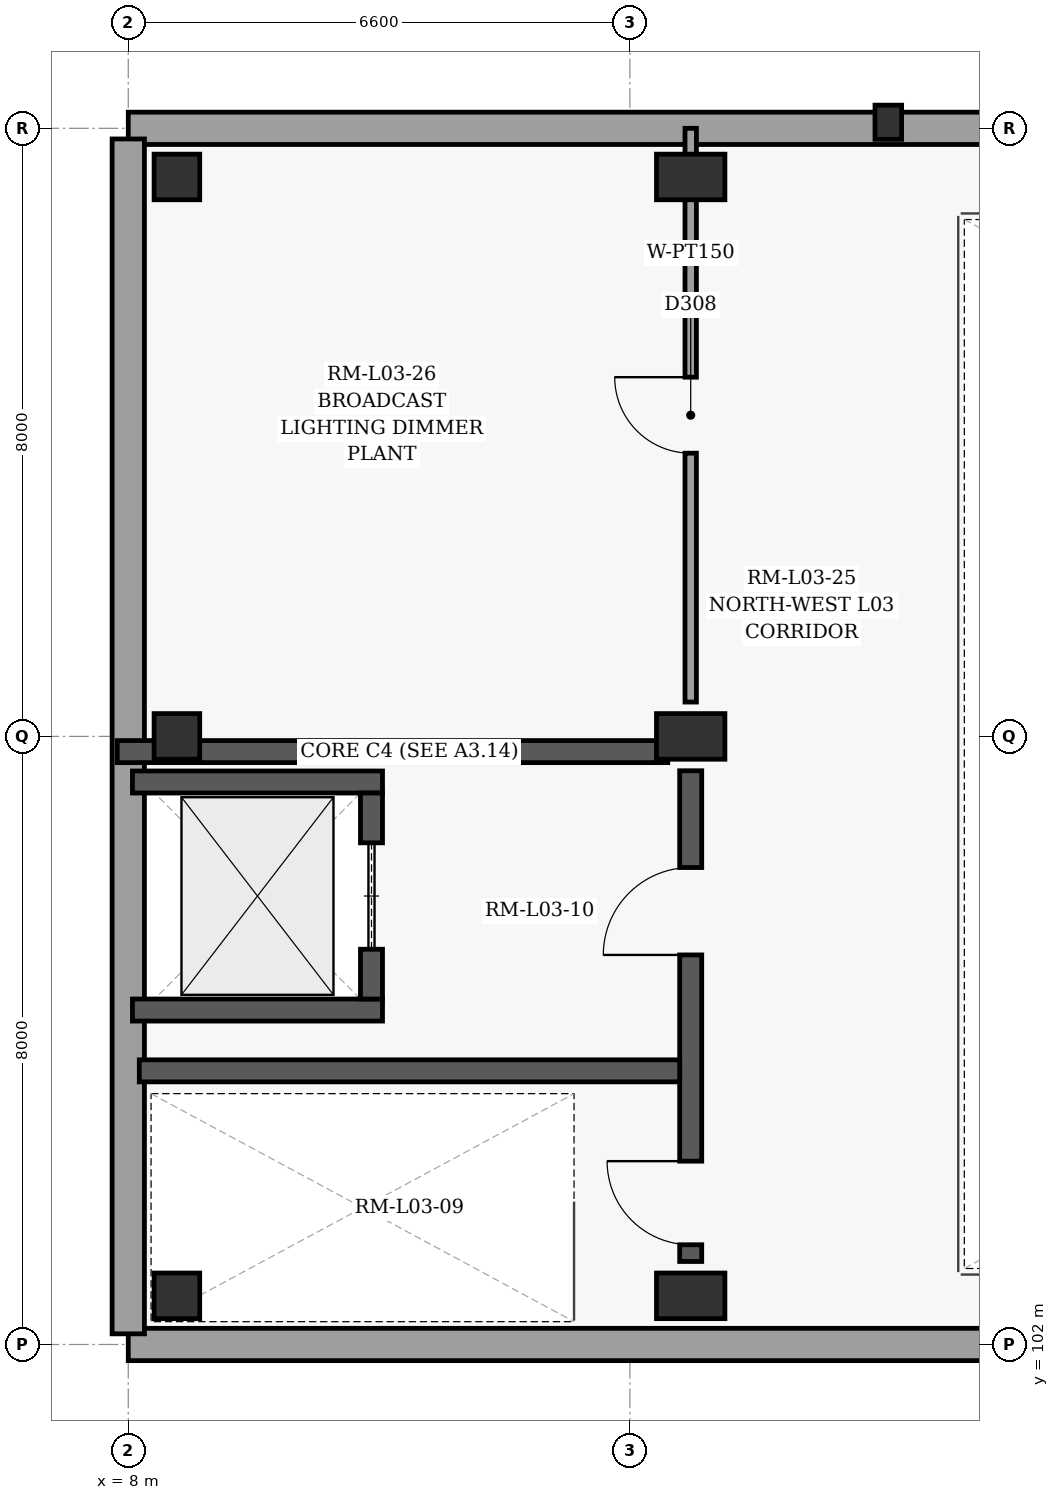
"""IFC4 building model, lengths in metres.
Left out: names, types, materials, properties, quantities, classifications, styles, units other than length and angle.
Written with IfcOpenShell. Run it as: python <this file> out.ifc"""

import sys

from ifc_helpers import new_model, si_unit, direction, frame, frame_2d, origin, origin_2d, place, context, subcontext, project, spatial, rectangle, extrude, element, fill, save


model = new_model("IFC4")
c1 = context("Model", 3, precision=1e-05, world=origin(), true_north=direction((0.0, 1.0)))
c2 = subcontext(c1, "Body", "Model", "MODEL_VIEW")
j1 = project(units=[si_unit("LENGTHUNIT", "METRE"), si_unit("PLANEANGLEUNIT", "RADIAN")], contexts=[c1])
p1 = place(None, origin())
s1 = spatial("IfcSite", under=j1, at=p1, CompositionType="ELEMENT")
p2 = place(p1, origin())
s2 = spatial("IfcBuilding", under=s1, at=p2, CompositionType="ELEMENT")
p3 = place(p2, frame((0.0, 0.0, 15.6)))
s3 = spatial("IfcBuildingStorey", under=s2, at=p3, CompositionType="ELEMENT", Elevation=15.6)
for number, where, z_axis, x_axis in (
    (1, (8.64, 102.64, 0.0), (0.0, 0.0, 1.0), (1.0, 0.0, 0.0)),
    (2, (8.64, 110.0, 0.0), (0.0, 0.0, 1.0), (1.0, 0.0, 0.0)),
    (3, (8.64, 117.36, 0.0), (0.0, 0.0, 1.0), (1.0, 0.0, 0.0)),
):
    element("IfcColumn", number, at=place(p3, frame(where, z_axis=z_axis, x_axis=x_axis)), inside=s3, PredefinedType="COLUMN", context=c2, shape_type="SweptSolid", body=[
        extrude(rectangle(XDim=0.6, YDim=0.6, at=origin_2d()), origin(), (0.0, 0.0, 1.0), 4.8),
    ])
for number, where, z_axis, x_axis in (
    (4, (15.4, 102.64, 0.0), (0.0, 0.0, 1.0), (1.0, 0.0, 0.0)),
    (5, (15.4, 110.0, 0.0), (0.0, 0.0, 1.0), (1.0, 0.0, 0.0)),
    (6, (15.4, 117.36, 0.0), (0.0, 0.0, 1.0), (1.0, 0.0, 0.0)),
):
    element("IfcColumn", number, at=place(p3, frame(where, z_axis=z_axis, x_axis=x_axis)), inside=s3, PredefinedType="COLUMN", context=c2, shape_type="SweptSolid", body=[
        extrude(rectangle(XDim=0.6, YDim=0.9, at=origin_2d()), origin(), (0.0, 0.0, 1.0), 4.8),
    ])
p4 = place(p3, frame((18.0, 118.08, 0.0), z_axis=(0.0, 0.0, 1.0), x_axis=(0.0, 1.0, 0.0)))
e7 = element("IfcColumn", 7, at=p4, inside=s3, PredefinedType="PILASTER", context=c2, shape_type="SweptSolid", body=[
    extrude(rectangle(XDim=0.35, YDim=0.45, at=origin_2d()), origin(), (0.0, 0.0, 1.0), 4.8),
])
for number, where, z_axis, x_axis in (
    (8, (8.0, 118.0, 0.0), (0.0, 0.0, 1.0), (1.0, 0.0, 0.0)),
    (9, (46.0, 102.0, 0.0), (0.0, 0.0, 1.0), (-1.0, 0.0, 0.0)),
):
    element("IfcWall", number, at=place(p3, frame(where, z_axis=z_axis, x_axis=x_axis)), inside=s3, PredefinedType="SOLIDWALL", context=c2, shape_type="SweptSolid", body=[
        extrude(rectangle(XDim=38.0, YDim=0.425, at=frame_2d((19.0, 0.0))), origin(), (0.0, 0.0, 1.0), 4.555),
    ])
p5 = place(p3, frame((8.0, 102.14, 0.0), z_axis=(0.0, 0.0, 1.0), x_axis=(0.0, 1.0, 0.0)))
e10 = element("IfcWall", 10, at=p5, inside=s3, PredefinedType="SOLIDWALL", context=c2, shape_type="SweptSolid", body=[
    extrude(rectangle(XDim=15.72, YDim=0.425, at=frame_2d((7.86, 0.0))), origin(), (0.0, 0.0, 1.0), 4.555),
])
p6 = place(p3, frame((7.855, 109.8, 0.0), z_axis=(0.0, 0.0, 1.0), x_axis=(1.0, 0.0, 0.0)))
e11 = element("IfcWall", 11, at=p6, inside=s3, PredefinedType="SHEAR", context=c2, shape_type="SweptSolid", body=[
    extrude(rectangle(XDim=7.243, YDim=0.29, at=frame_2d((3.622, 0.0))), origin(), (0.0, 0.0, 1.0), 4.555),
])
p7 = place(p3, frame((15.4, 103.092, 0.0), z_axis=(0.0, 0.0, 1.0), x_axis=(0.0, 1.0, 0.0)))
e12 = element("IfcWall", 12, at=p7, inside=s3, PredefinedType="SHEAR", context=c2, shape_type="SweptSolid", body=[
    extrude(rectangle(XDim=6.456, YDim=0.29, at=frame_2d((3.228, 0.0))), origin(), (0.0, 0.0, 1.0), 4.555),
])
p8 = place(p7, frame((0.22, 0.0, 0.0)))
e13 = element("IfcOpeningElement", 13, at=p8, cuts=e12, PredefinedType="OPENING", context=c2, shape_type="SweptSolid", body=[
    extrude(rectangle(XDim=1.1, YDim=2.15, at=frame_2d((0.55, 1.075))), frame((0.0, 0.155, 0.0), z_axis=(0.0, -1.0, 0.0), x_axis=(1.0, 0.0, 0.0)), (0.0, 0.0, 1.0), 0.31),
])
p9 = place(p7, frame((4.033, 0.0, 0.0)))
e14 = element("IfcOpeningElement", 14, at=p9, cuts=e12, PredefinedType="OPENING", context=c2, shape_type="SweptSolid", body=[
    extrude(rectangle(XDim=1.15, YDim=2.2, at=frame_2d((0.575, 1.1))), frame((0.0, 0.155, 0.0), z_axis=(0.0, -1.0, 0.0), x_axis=(1.0, 0.0, 0.0)), (0.0, 0.0, 1.0), 0.31),
])
p10 = place(p3, frame((8.145, 105.6, 0.0), z_axis=(0.0, 0.0, 1.0), x_axis=(1.0, 0.0, 0.0)))
e15 = element("IfcWall", 15, at=p10, inside=s3, PredefinedType="SHEAR", context=c2, shape_type="SweptSolid", body=[
    extrude(rectangle(XDim=7.11, YDim=0.29, at=frame_2d((3.555, 0.0))), origin(), (0.0, 0.0, 1.0), 4.555),
])
for number, where, z_axis, x_axis in (
    (16, (8.055, 106.4, 0.0), (0.0, 0.0, 1.0), (1.0, 0.0, 0.0)),
    (17, (8.055, 109.4, 0.0), (0.0, 0.0, 1.0), (1.0, 0.0, 0.0)),
):
    element("IfcWall", number, at=place(p3, frame(where, z_axis=z_axis, x_axis=x_axis)), inside=s3, PredefinedType="SHEAR", context=c2, shape_type="SweptSolid", body=[
        extrude(rectangle(XDim=3.29, YDim=0.29, at=frame_2d((1.645, 0.0))), origin(), (0.0, 0.0, 1.0), 4.555),
    ])
p11 = place(p3, frame((11.2, 106.545, 0.0), z_axis=(0.0, 0.0, 1.0), x_axis=(0.0, 1.0, 0.0)))
e18 = element("IfcWall", 18, at=p11, inside=s3, PredefinedType="SHEAR", context=c2, shape_type="SweptSolid", body=[
    extrude(rectangle(XDim=2.71, YDim=0.29, at=frame_2d((1.355, 0.0))), origin(), (0.0, 0.0, 1.0), 4.555),
])
p12 = place(p11, frame((0.655, 0.0, 0.0)))
e19 = element("IfcOpeningElement", 19, at=p12, cuts=e18, PredefinedType="OPENING", context=c2, shape_type="SweptSolid", body=[
    extrude(rectangle(XDim=1.4, YDim=2.25, at=frame_2d((0.7, 1.125))), frame((0.0, 0.155, 0.0), z_axis=(0.0, -1.0, 0.0), x_axis=(1.0, 0.0, 0.0)), (0.0, 0.0, 1.0), 0.31),
])
p13 = place(p3, frame((15.4, 110.452, 0.0), z_axis=(0.0, 0.0, 1.0), x_axis=(0.0, 1.0, 0.0)))
e20 = element("IfcWall", 20, at=p13, inside=s3, PredefinedType="PARTITIONING", context=c2, shape_type="SweptSolid", body=[
    extrude(rectangle(XDim=7.548, YDim=0.15, at=frame_2d((3.774, 0.0))), origin(), (0.0, 0.0, 1.0), 2.882),
])
p14 = place(p13, frame((3.274, 0.0, 0.0)))
e21 = element("IfcOpeningElement", 21, at=p14, cuts=e20, PredefinedType="OPENING", context=c2, shape_type="SweptSolid", body=[
    extrude(rectangle(XDim=1.0, YDim=2.1, at=frame_2d((0.5, 1.05))), frame((0.0, 0.085, 0.0), z_axis=(0.0, -1.0, 0.0), x_axis=(1.0, 0.0, 0.0)), (0.0, 0.0, 1.0), 0.17),
])
p15 = place(p8, origin())
e22 = element("IfcDoor", 22, at=p15, inside=s3, OperationType="SINGLE_SWING_RIGHT", PredefinedType="DOOR", context=c2, shape_type="SweptSolid", body=[
    extrude(rectangle(XDim=1.1, YDim=2.15, at=frame_2d((0.55, 1.075))), frame((0.0, 0.025, 0.0), z_axis=(0.0, -1.0, 0.0), x_axis=(1.0, 0.0, 0.0)), (0.0, 0.0, 1.0), 0.05),
])
fill(e13, e22)
p16 = place(p9, origin())
e23 = element("IfcDoor", 23, at=p16, inside=s3, OperationType="SINGLE_SWING_LEFT", PredefinedType="DOOR", context=c2, shape_type="SweptSolid", body=[
    extrude(rectangle(XDim=1.15, YDim=2.2, at=frame_2d((0.575, 1.1))), frame((0.0, 0.025, 0.0), z_axis=(0.0, -1.0, 0.0), x_axis=(1.0, 0.0, 0.0)), (0.0, 0.0, 1.0), 0.05),
])
fill(e14, e23)
p17 = place(p12, origin())
e24 = element("IfcDoor", 24, at=p17, inside=s3, OperationType="SLIDING_TO_LEFT", PredefinedType="DOOR", context=c2, shape_type="SweptSolid", body=[
    extrude(rectangle(XDim=1.4, YDim=2.25, at=frame_2d((0.7, 1.125))), frame((0.0, 0.025, 0.0), z_axis=(0.0, -1.0, 0.0), x_axis=(1.0, 0.0, 0.0)), (0.0, 0.0, 1.0), 0.05),
])
fill(e19, e24)
p18 = place(p14, origin())
e25 = element("IfcDoor", 25, at=p18, inside=s3, OperationType="SINGLE_SWING_RIGHT", PredefinedType="DOOR", context=c2, shape_type="SweptSolid", body=[
    extrude(rectangle(XDim=1.0, YDim=2.1, at=frame_2d((0.5, 1.05))), frame((0.0, 0.025, 0.0), z_axis=(0.0, -1.0, 0.0), x_axis=(1.0, 0.0, 0.0)), (0.0, 0.0, 1.0), 0.05),
])
fill(e21, e25)
save(model, sys.argv[1])
